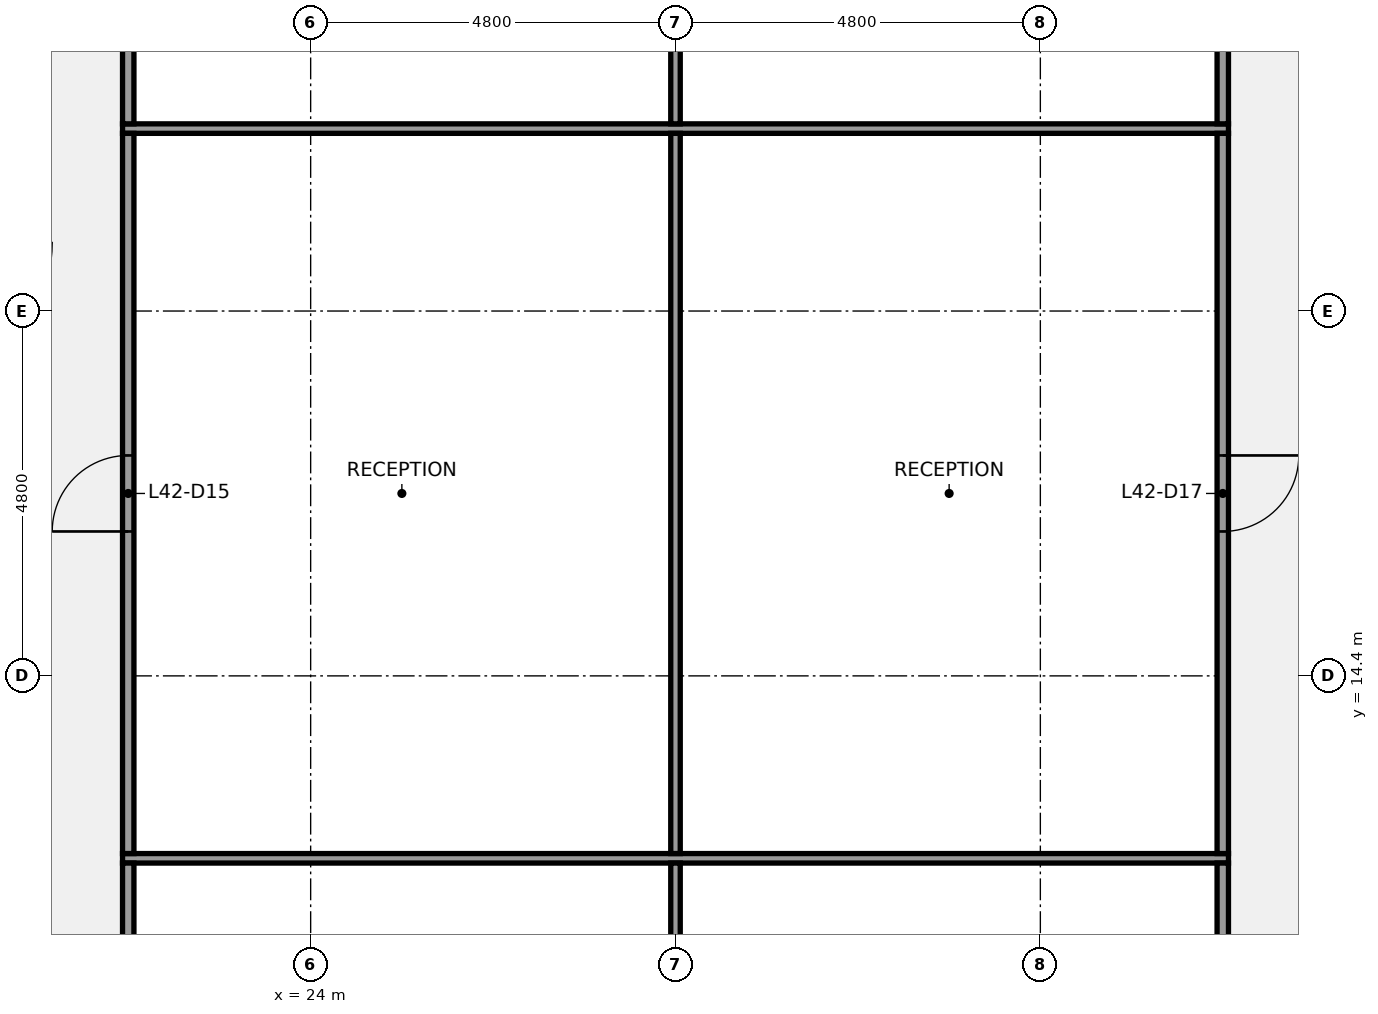
"""IFC4 building model, lengths in metres.
Left out: names, types, materials, properties, quantities, classifications, styles, units other than length and angle.
Written with IfcOpenShell. Run it as: python <this file> out.ifc"""

import sys

from ifc_helpers import new_model, si_unit, direction, frame, frame_2d, origin, place, context, subcontext, project, spatial, rectangle, extrude, element, fill, save


model = new_model("IFC4")
c1 = context("Model", 3, precision=1e-05, world=origin(), true_north=direction((0.0, 1.0)))
c2 = subcontext(c1, "Body", "Model", "MODEL_VIEW")
j1 = project(units=[si_unit("LENGTHUNIT", "METRE"), si_unit("PLANEANGLEUNIT", "RADIAN")], contexts=[c1])
p1 = place(None, origin())
s1 = spatial("IfcSite", under=j1, at=p1, CompositionType="ELEMENT")
p2 = place(p1, origin())
s2 = spatial("IfcBuilding", under=s1, at=p2, CompositionType="ELEMENT")
p3 = place(p2, frame((0.0, 0.0, 197.2)))
s3 = spatial("IfcBuildingStorey", under=s2, at=p3, CompositionType="ELEMENT", Elevation=197.2)
for number, where, z_axis, x_axis in (
    (1, (21.525, 12.0, 0.0), (0.0, 0.0, 1.0), (1.0, 0.0, 0.0)),
    (2, (21.525, 21.6, 0.0), (0.0, 0.0, 1.0), (1.0, 0.0, 0.0)),
):
    element("IfcWall", number, at=place(p3, frame(where, z_axis=z_axis, x_axis=x_axis)), inside=s3, PredefinedType="PARTITIONING", context=c2, shape_type="SweptSolid", body=[
        extrude(rectangle(XDim=14.55, YDim=0.125, at=frame_2d((7.275, 0.0))), origin(), (0.0, 0.0, 1.0), 2.87),
    ])
p4 = place(p3, frame((21.6, 7.275, 0.0), z_axis=(0.0, 0.0, 1.0), x_axis=(0.0, 1.0, 0.0)))
e3 = element("IfcWall", 3, at=p4, inside=s3, PredefinedType="PARTITIONING", context=c2, shape_type="SweptSolid", body=[
    extrude(rectangle(XDim=4.663, YDim=0.15, at=frame_2d((2.331, 0.0))), origin(), (0.0, 0.0, 1.0), 2.87),
])
p5 = place(p3, frame((21.6, 12.062, 0.0), z_axis=(0.0, 0.0, 1.0), x_axis=(0.0, 1.0, 0.0)))
e4 = element("IfcWall", 4, at=p5, inside=s3, PredefinedType="PARTITIONING", context=c2, shape_type="SweptSolid", body=[
    extrude(rectangle(XDim=9.475, YDim=0.15, at=frame_2d((4.738, 0.0))), origin(), (0.0, 0.0, 1.0), 2.87),
])
p6 = place(p5, frame((4.238, 0.0, 0.0)))
e5 = element("IfcOpeningElement", 5, at=p6, cuts=e4, PredefinedType="OPENING", context=c2, shape_type="SweptSolid", body=[
    extrude(rectangle(XDim=1.0, YDim=2.1, at=frame_2d((0.5, 1.05))), frame((0.0, 0.085, 0.0), z_axis=(0.0, -1.0, 0.0), x_axis=(1.0, 0.0, 0.0)), (0.0, 0.0, 1.0), 0.17),
])
p7 = place(p3, frame((21.6, 21.663, 0.0), z_axis=(0.0, 0.0, 1.0), x_axis=(0.0, 1.0, 0.0)))
e6 = element("IfcWall", 6, at=p7, inside=s3, PredefinedType="PARTITIONING", context=c2, shape_type="SweptSolid", body=[
    extrude(rectangle(XDim=19.062, YDim=0.15, at=frame_2d((9.531, 0.0))), origin(), (0.0, 0.0, 1.0), 2.87),
])
p8 = place(p7, frame((9.031, 0.0, 0.0)))
e7 = element("IfcOpeningElement", 7, at=p8, cuts=e6, PredefinedType="OPENING", context=c2, shape_type="SweptSolid", body=[
    extrude(rectangle(XDim=1.0, YDim=2.1, at=frame_2d((0.5, 1.05))), frame((0.0, 0.085, 0.0), z_axis=(0.0, -1.0, 0.0), x_axis=(1.0, 0.0, 0.0)), (0.0, 0.0, 1.0), 0.17),
])
p9 = place(p3, frame((28.8, 7.275, 0.0), z_axis=(0.0, 0.0, 1.0), x_axis=(0.0, 1.0, 0.0)))
e8 = element("IfcWall", 8, at=p9, inside=s3, PredefinedType="PARTITIONING", context=c2, shape_type="SweptSolid", body=[
    extrude(rectangle(XDim=4.663, YDim=0.125, at=frame_2d((2.331, 0.0))), origin(), (0.0, 0.0, 1.0), 2.87),
])
p10 = place(p3, frame((28.8, 12.062, 0.0), z_axis=(0.0, 0.0, 1.0), x_axis=(0.0, 1.0, 0.0)))
e9 = element("IfcWall", 9, at=p10, inside=s3, PredefinedType="PARTITIONING", context=c2, shape_type="SweptSolid", body=[
    extrude(rectangle(XDim=9.475, YDim=0.125, at=frame_2d((4.738, 0.0))), origin(), (0.0, 0.0, 1.0), 2.87),
])
p11 = place(p3, frame((28.8, 21.663, 0.0), z_axis=(0.0, 0.0, 1.0), x_axis=(0.0, 1.0, 0.0)))
e10 = element("IfcWall", 10, at=p11, inside=s3, PredefinedType="PARTITIONING", context=c2, shape_type="SweptSolid", body=[
    extrude(rectangle(XDim=19.062, YDim=0.125, at=frame_2d((9.531, 0.0))), origin(), (0.0, 0.0, 1.0), 2.87),
])
p12 = place(p3, frame((36.0, 7.275, 0.0), z_axis=(0.0, 0.0, 1.0), x_axis=(0.0, 1.0, 0.0)))
e11 = element("IfcWall", 11, at=p12, inside=s3, PredefinedType="PARTITIONING", context=c2, shape_type="SweptSolid", body=[
    extrude(rectangle(XDim=4.663, YDim=0.15, at=frame_2d((2.331, 0.0))), origin(), (0.0, 0.0, 1.0), 2.87),
])
p13 = place(p3, frame((36.0, 12.062, 0.0), z_axis=(0.0, 0.0, 1.0), x_axis=(0.0, 1.0, 0.0)))
e12 = element("IfcWall", 12, at=p13, inside=s3, PredefinedType="PARTITIONING", context=c2, shape_type="SweptSolid", body=[
    extrude(rectangle(XDim=9.475, YDim=0.15, at=frame_2d((4.738, 0.0))), origin(), (0.0, 0.0, 1.0), 2.87),
])
p14 = place(p13, frame((4.238, 0.0, 0.0)))
e13 = element("IfcOpeningElement", 13, at=p14, cuts=e12, PredefinedType="OPENING", context=c2, shape_type="SweptSolid", body=[
    extrude(rectangle(XDim=1.0, YDim=2.1, at=frame_2d((0.5, 1.05))), frame((0.0, 0.085, 0.0), z_axis=(0.0, -1.0, 0.0), x_axis=(1.0, 0.0, 0.0)), (0.0, 0.0, 1.0), 0.17),
])
p15 = place(p3, frame((36.0, 21.663, 0.0), z_axis=(0.0, 0.0, 1.0), x_axis=(0.0, 1.0, 0.0)))
e14 = element("IfcWall", 14, at=p15, inside=s3, PredefinedType="PARTITIONING", context=c2, shape_type="SweptSolid", body=[
    extrude(rectangle(XDim=19.062, YDim=0.15, at=frame_2d((9.531, 0.0))), origin(), (0.0, 0.0, 1.0), 2.87),
])
p16 = place(p15, frame((9.031, 0.0, 0.0)))
e15 = element("IfcOpeningElement", 15, at=p16, cuts=e14, PredefinedType="OPENING", context=c2, shape_type="SweptSolid", body=[
    extrude(rectangle(XDim=1.0, YDim=2.1, at=frame_2d((0.5, 1.05))), frame((0.0, 0.085, 0.0), z_axis=(0.0, -1.0, 0.0), x_axis=(1.0, 0.0, 0.0)), (0.0, 0.0, 1.0), 0.17),
])
p17 = place(p6, origin())
e16 = element("IfcDoor", 16, at=p17, inside=s3, OperationType="SINGLE_SWING_LEFT", PredefinedType="DOOR", context=c2, shape_type="SweptSolid", body=[
    extrude(rectangle(XDim=1.0, YDim=2.1, at=frame_2d((0.5, 1.05))), frame((0.0, 0.025, 0.0), z_axis=(0.0, -1.0, 0.0), x_axis=(1.0, 0.0, 0.0)), (0.0, 0.0, 1.0), 0.05),
])
fill(e5, e16)
p18 = place(p14, origin())
e17 = element("IfcDoor", 17, at=p18, inside=s3, OperationType="SINGLE_SWING_RIGHT", PredefinedType="DOOR", context=c2, shape_type="SweptSolid", body=[
    extrude(rectangle(XDim=1.0, YDim=2.1, at=frame_2d((0.5, 1.05))), frame((0.0, 0.025, 0.0), z_axis=(0.0, -1.0, 0.0), x_axis=(1.0, 0.0, 0.0)), (0.0, 0.0, 1.0), 0.05),
])
fill(e13, e17)
save(model, sys.argv[1])
